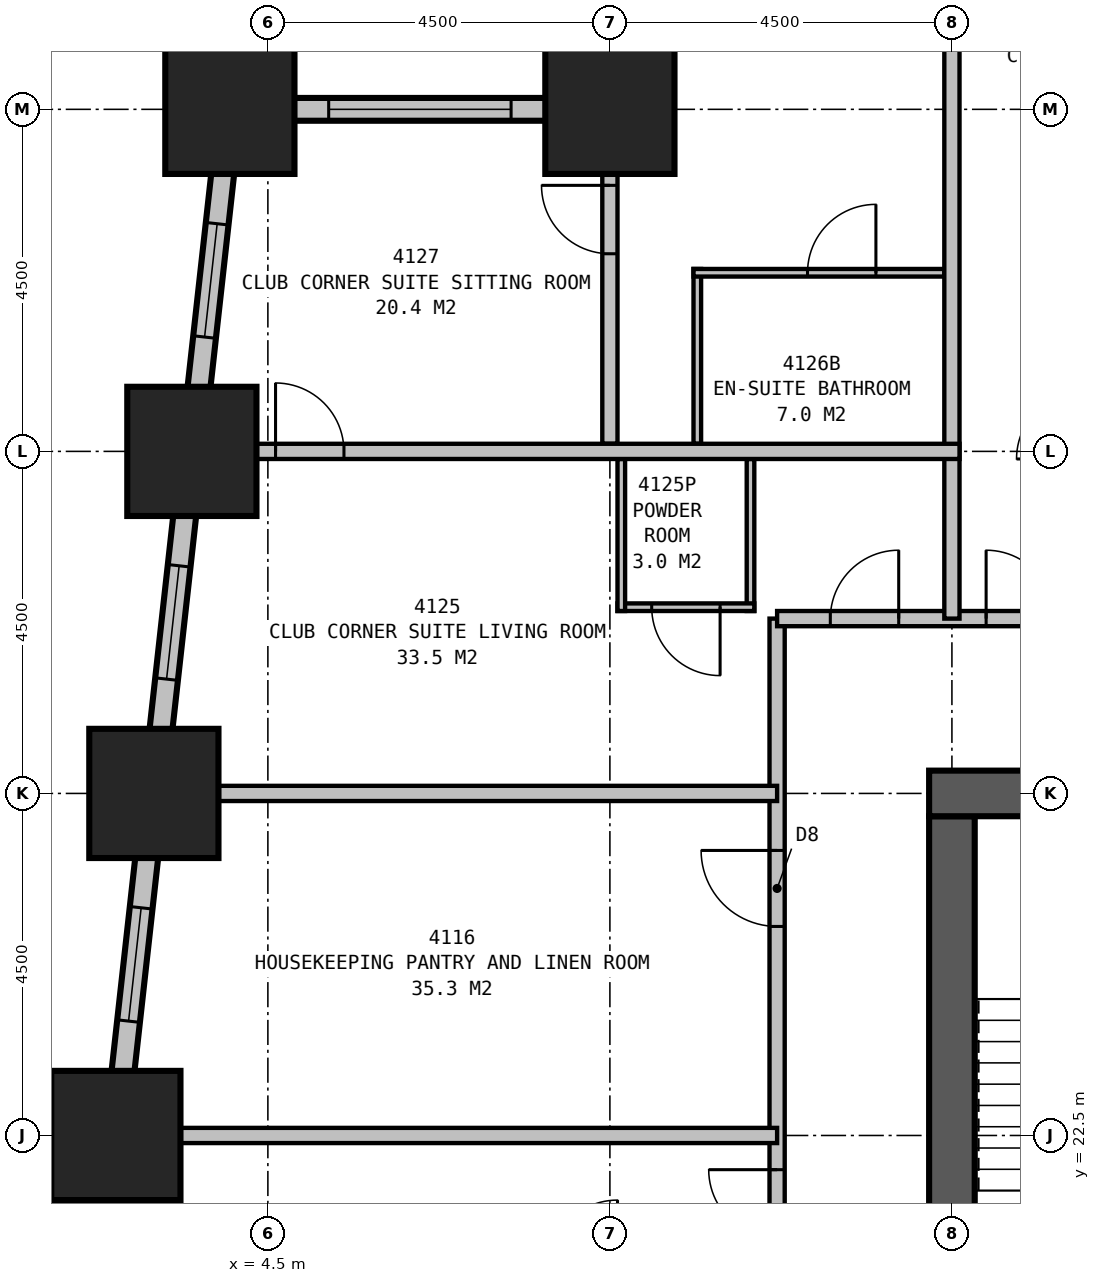
"""IFC4 building model, lengths in metres.
Left out: names, types, materials, properties, quantities, classifications, styles, units other than length and angle.
Written with IfcOpenShell. Run it as: python <this file> out.ifc"""

import sys

from ifc_helpers import new_model, si_unit, direction, frame, frame_2d, origin, origin_2d, place, context, subcontext, project, spatial, rectangle, extrude, element, fill, save


model = new_model("IFC4")
c1 = context("Model", 3, precision=1e-05, world=origin(), true_north=direction((0.0, 1.0)))
c2 = subcontext(c1, "Body", "Model", "MODEL_VIEW")
j1 = project(units=[si_unit("LENGTHUNIT", "METRE"), si_unit("PLANEANGLEUNIT", "RADIAN")], contexts=[c1])
p1 = place(None, origin())
s1 = spatial("IfcSite", under=j1, at=p1, CompositionType="ELEMENT")
p2 = place(p1, origin())
s2 = spatial("IfcBuilding", under=s1, at=p2, CompositionType="ELEMENT")
p3 = place(p2, frame((0.0, 0.0, 162.4)))
s3 = spatial("IfcBuildingStorey", under=s2, at=p3, CompositionType="ELEMENT", Elevation=162.4)
for number, where, z_axis, x_axis in (
    (1, (9.0, 36.0, 0.0), (0.0, 0.0, 1.0), (1.0, 0.0, 0.0)),
    (2, (4.0, 36.0, 0.0), (0.0, 0.0, 1.0), (1.0, 0.0, 0.0)),
    (3, (3.5, 31.5, 0.0), (0.0, 0.0, 1.0), (1.0, 0.0, 0.0)),
    (4, (3.0, 27.0, 0.0), (0.0, 0.0, 1.0), (1.0, 0.0, 0.0)),
    (5, (2.5, 22.5, 0.0), (0.0, 0.0, 1.0), (1.0, 0.0, 0.0)),
):
    element("IfcColumn", number, at=place(p3, frame(where, z_axis=z_axis, x_axis=x_axis)), inside=s3, PredefinedType="COLUMN", context=c2, shape_type="SweptSolid", body=[
        extrude(rectangle(XDim=1.7, YDim=1.7, at=origin_2d()), origin(), (0.0, 0.0, 1.0), 3.5),
    ])
p4 = place(p3, frame((36.3, 27.0, 0.0), z_axis=(0.0, 0.0, 1.0), x_axis=(-1.0, 0.0, 0.0)))
e6 = element("IfcWall", 6, at=p4, inside=s3, PredefinedType="SHEAR", context=c2, shape_type="SweptSolid", body=[
    extrude(rectangle(XDim=23.1, YDim=0.6, at=frame_2d((11.55, 0.0))), origin(), (0.0, 0.0, 1.0), 3.5),
])
p5 = place(p4, frame((17.05, 0.0, 0.0)))
e7 = element("IfcOpeningElement", 7, at=p5, cuts=e6, PredefinedType="OPENING", context=c2, shape_type="SweptSolid", body=[
    extrude(rectangle(XDim=1.0, YDim=2.1, at=frame_2d((0.5, 1.05))), frame((0.0, 0.31, 0.0), z_axis=(0.0, -1.0, 0.0), x_axis=(1.0, 0.0, 0.0)), (0.0, 0.0, 1.0), 0.62),
])
p6 = place(p4, frame((12.05, 0.0, 0.0)))
e8 = element("IfcOpeningElement", 8, at=p6, cuts=e6, PredefinedType="OPENING", context=c2, shape_type="SweptSolid", body=[
    extrude(rectangle(XDim=1.0, YDim=2.1, at=frame_2d((0.5, 1.05))), frame((0.0, 0.31, 0.0), z_axis=(0.0, -1.0, 0.0), x_axis=(1.0, 0.0, 0.0)), (0.0, 0.0, 1.0), 0.62),
])
p7 = place(p4, frame((7.05, 0.0, 0.0)))
e9 = element("IfcOpeningElement", 9, at=p7, cuts=e6, PredefinedType="OPENING", context=c2, shape_type="SweptSolid", body=[
    extrude(rectangle(XDim=1.0, YDim=2.1, at=frame_2d((0.5, 1.05))), frame((0.0, 0.31, 0.0), z_axis=(0.0, -1.0, 0.0), x_axis=(1.0, 0.0, 0.0)), (0.0, 0.0, 1.0), 0.62),
])
p8 = place(p3, frame((13.5, 26.7, 0.0), z_axis=(0.0, 0.0, 1.0), x_axis=(0.0, -1.0, 0.0)))
e10 = element("IfcWall", 10, at=p8, inside=s3, PredefinedType="SHEAR", context=c2, shape_type="SweptSolid", body=[
    extrude(rectangle(XDim=6.7, YDim=0.6, at=frame_2d((3.35, 0.0))), origin(), (0.0, 0.0, 1.0), 3.5),
])
p9 = place(p3, frame((9.0, 40.65, 0.0), z_axis=(0.0, 0.0, 1.0), x_axis=(0.0, -1.0, 0.0)))
e11 = element("IfcWall", 11, at=p9, inside=s3, PredefinedType="STANDARD", context=c2, shape_type="SweptSolid", body=[
    extrude(rectangle(XDim=4.8, YDim=0.3, at=frame_2d((2.4, 0.0))), origin(), (0.0, 0.0, 1.0), 2.25),
])
p10 = place(p9, frame((1.2, 0.0, 0.5)))
e12 = element("IfcOpeningElement", 12, at=p10, cuts=e11, PredefinedType="OPENING", context=c2, shape_type="SweptSolid", body=[
    extrude(rectangle(XDim=2.4, YDim=1.6, at=frame_2d((1.2, 0.8))), frame((0.0, 0.16, 0.0), z_axis=(0.0, -1.0, 0.0), x_axis=(1.0, 0.0, 0.0)), (0.0, 0.0, 1.0), 0.32),
])
p11 = place(p3, frame((9.15, 36.0, 0.0), z_axis=(0.0, 0.0, 1.0), x_axis=(-1.0, 0.0, 0.0)))
e13 = element("IfcWall", 13, at=p11, inside=s3, PredefinedType="STANDARD", context=c2, shape_type="SweptSolid", body=[
    extrude(rectangle(XDim=5.3, YDim=0.3, at=frame_2d((2.65, 0.0))), origin(), (0.0, 0.0, 1.0), 2.25),
])
p12 = place(p11, frame((1.45, 0.0, 0.5)))
e14 = element("IfcOpeningElement", 14, at=p12, cuts=e13, PredefinedType="OPENING", context=c2, shape_type="SweptSolid", body=[
    extrude(rectangle(XDim=2.4, YDim=1.6, at=frame_2d((1.2, 0.8))), frame((0.0, 0.16, 0.0), z_axis=(0.0, -1.0, 0.0), x_axis=(1.0, 0.0, 0.0)), (0.0, 0.0, 1.0), 0.32),
])
p13 = place(p3, frame((4.017, 36.149, 0.0), z_axis=(0.0, 0.0, 1.0), x_axis=(-0.110433862387, -0.993883475081, 0.0)))
e15 = element("IfcWall", 15, at=p13, inside=s3, PredefinedType="STANDARD", context=c2, shape_type="SweptSolid", body=[
    extrude(rectangle(XDim=22.939, YDim=0.3, at=frame_2d((11.469, 0.0))), origin(), (0.0, 0.0, 1.0), 2.25),
])
p14 = place(p13, frame((1.664, 0.0, 0.5)))
e16 = element("IfcOpeningElement", 16, at=p14, cuts=e15, PredefinedType="OPENING", context=c2, shape_type="SweptSolid", body=[
    extrude(rectangle(XDim=1.5, YDim=1.6, at=frame_2d((0.75, 0.8))), frame((0.0, 0.16, 0.0), z_axis=(0.0, -1.0, 0.0), x_axis=(1.0, 0.0, 0.0)), (0.0, 0.0, 1.0), 0.32),
])
p15 = place(p13, frame((6.192, 0.0, 0.5)))
e17 = element("IfcOpeningElement", 17, at=p15, cuts=e15, PredefinedType="OPENING", context=c2, shape_type="SweptSolid", body=[
    extrude(rectangle(XDim=1.5, YDim=1.6, at=frame_2d((0.75, 0.8))), frame((0.0, 0.16, 0.0), z_axis=(0.0, -1.0, 0.0), x_axis=(1.0, 0.0, 0.0)), (0.0, 0.0, 1.0), 0.32),
])
p16 = place(p13, frame((10.719, 0.0, 0.5)))
e18 = element("IfcOpeningElement", 18, at=p16, cuts=e15, PredefinedType="OPENING", context=c2, shape_type="SweptSolid", body=[
    extrude(rectangle(XDim=1.5, YDim=1.6, at=frame_2d((0.75, 0.8))), frame((0.0, 0.16, 0.0), z_axis=(0.0, -1.0, 0.0), x_axis=(1.0, 0.0, 0.0)), (0.0, 0.0, 1.0), 0.32),
])
p17 = place(p13, frame((15.247, 0.0, 0.5)))
e19 = element("IfcOpeningElement", 19, at=p17, cuts=e15, PredefinedType="OPENING", context=c2, shape_type="SweptSolid", body=[
    extrude(rectangle(XDim=1.5, YDim=1.6, at=frame_2d((0.75, 0.8))), frame((0.0, 0.16, 0.0), z_axis=(0.0, -1.0, 0.0), x_axis=(1.0, 0.0, 0.0)), (0.0, 0.0, 1.0), 0.32),
])
p18 = place(p13, frame((19.775, 0.0, 0.5)))
e20 = element("IfcOpeningElement", 20, at=p18, cuts=e15, PredefinedType="OPENING", context=c2, shape_type="SweptSolid", body=[
    extrude(rectangle(XDim=1.5, YDim=1.6, at=frame_2d((0.75, 0.8))), frame((0.0, 0.16, 0.0), z_axis=(0.0, -1.0, 0.0), x_axis=(1.0, 0.0, 0.0)), (0.0, 0.0, 1.0), 0.32),
])
p19 = place(p3, frame((11.2, 29.3, 0.0), z_axis=(0.0, 0.0, 1.0), x_axis=(1.0, 0.0, 0.0)))
e21 = element("IfcWall", 21, at=p19, inside=s3, PredefinedType="PARTITIONING", context=c2, shape_type="SweptSolid", body=[
    extrude(rectangle(XDim=27.1, YDim=0.2, at=frame_2d((13.55, 0.0))), origin(), (0.0, 0.0, 1.0), 3.25),
])
p20 = place(p19, frame((2.75, 0.0, 0.0)))
e22 = element("IfcOpeningElement", 22, at=p20, cuts=e21, PredefinedType="OPENING", context=c2, shape_type="SweptSolid", body=[
    extrude(rectangle(XDim=0.9, YDim=2.1, at=frame_2d((0.45, 1.05))), frame((0.0, 0.11, 0.0), z_axis=(0.0, -1.0, 0.0), x_axis=(1.0, 0.0, 0.0)), (0.0, 0.0, 1.0), 0.22),
])
p21 = place(p19, frame((9.55, 0.0, 0.0)))
e23 = element("IfcOpeningElement", 23, at=p21, cuts=e21, PredefinedType="OPENING", context=c2, shape_type="SweptSolid", body=[
    extrude(rectangle(XDim=0.9, YDim=2.1, at=frame_2d((0.45, 1.05))), frame((0.0, 0.11, 0.0), z_axis=(0.0, -1.0, 0.0), x_axis=(1.0, 0.0, 0.0)), (0.0, 0.0, 1.0), 0.22),
])
p22 = place(p19, frame((16.25, 0.0, 0.0)))
e24 = element("IfcOpeningElement", 24, at=p22, cuts=e21, PredefinedType="OPENING", context=c2, shape_type="SweptSolid", body=[
    extrude(rectangle(XDim=0.9, YDim=2.1, at=frame_2d((0.45, 1.05))), frame((0.0, 0.11, 0.0), z_axis=(0.0, -1.0, 0.0), x_axis=(1.0, 0.0, 0.0)), (0.0, 0.0, 1.0), 0.22),
])
p23 = place(p19, frame((20.75, 0.0, 0.0)))
e25 = element("IfcOpeningElement", 25, at=p23, cuts=e21, PredefinedType="OPENING", context=c2, shape_type="SweptSolid", body=[
    extrude(rectangle(XDim=0.9, YDim=2.1, at=frame_2d((0.45, 1.05))), frame((0.0, 0.11, 0.0), z_axis=(0.0, -1.0, 0.0), x_axis=(1.0, 0.0, 0.0)), (0.0, 0.0, 1.0), 0.22),
])
p24 = place(p19, frame((25.5, 0.0, 0.0)))
e26 = element("IfcOpeningElement", 26, at=p24, cuts=e21, PredefinedType="OPENING", context=c2, shape_type="SweptSolid", body=[
    extrude(rectangle(XDim=0.9, YDim=2.1, at=frame_2d((0.45, 1.05))), frame((0.0, 0.11, 0.0), z_axis=(0.0, -1.0, 0.0), x_axis=(1.0, 0.0, 0.0)), (0.0, 0.0, 1.0), 0.22),
])
p25 = place(p19, frame((0.7, 0.0, 0.0)))
e27 = element("IfcOpeningElement", 27, at=p25, cuts=e21, PredefinedType="OPENING", context=c2, shape_type="SweptSolid", body=[
    extrude(rectangle(XDim=0.9, YDim=2.1, at=frame_2d((0.45, 1.05))), frame((0.0, 0.11, 0.0), z_axis=(0.0, -1.0, 0.0), x_axis=(1.0, 0.0, 0.0)), (0.0, 0.0, 1.0), 0.22),
])
p26 = place(p3, frame((11.2, 10.6, 0.0), z_axis=(0.0, 0.0, 1.0), x_axis=(0.0, 1.0, 0.0)))
e28 = element("IfcWall", 28, at=p26, inside=s3, PredefinedType="PARTITIONING", context=c2, shape_type="SweptSolid", body=[
    extrude(rectangle(XDim=18.7, YDim=0.2, at=frame_2d((9.35, 0.0))), origin(), (0.0, 0.0, 1.0), 3.25),
])
p27 = place(p26, frame((6.05, 0.0, 0.0)))
e29 = element("IfcOpeningElement", 29, at=p27, cuts=e28, PredefinedType="OPENING", context=c2, shape_type="SweptSolid", body=[
    extrude(rectangle(XDim=0.9, YDim=2.1, at=frame_2d((0.45, 1.05))), frame((0.0, 0.11, 0.0), z_axis=(0.0, -1.0, 0.0), x_axis=(1.0, 0.0, 0.0)), (0.0, 0.0, 1.0), 0.22),
])
p28 = place(p26, frame((10.55, 0.0, 0.0)))
e30 = element("IfcOpeningElement", 30, at=p28, cuts=e28, PredefinedType="OPENING", context=c2, shape_type="SweptSolid", body=[
    extrude(rectangle(XDim=0.9, YDim=2.1, at=frame_2d((0.45, 1.05))), frame((0.0, 0.11, 0.0), z_axis=(0.0, -1.0, 0.0), x_axis=(1.0, 0.0, 0.0)), (0.0, 0.0, 1.0), 0.22),
])
p29 = place(p26, frame((14.65, 0.0, 0.0)))
e31 = element("IfcOpeningElement", 31, at=p29, cuts=e28, PredefinedType="OPENING", context=c2, shape_type="SweptSolid", body=[
    extrude(rectangle(XDim=1.0, YDim=2.1, at=frame_2d((0.5, 1.05))), frame((0.0, 0.11, 0.0), z_axis=(0.0, -1.0, 0.0), x_axis=(1.0, 0.0, 0.0)), (0.0, 0.0, 1.0), 0.22),
])
p30 = place(p3, frame((11.2, 22.5, 0.0), z_axis=(0.0, 0.0, 1.0), x_axis=(-1.0, 0.0, 0.0)))
e32 = element("IfcWall", 32, at=p30, inside=s3, PredefinedType="PARTITIONING", context=c2, shape_type="SweptSolid", body=[
    extrude(rectangle(XDim=8.699, YDim=0.2, at=frame_2d((4.35, 0.0))), origin(), (0.0, 0.0, 1.0), 2.25),
])
p31 = place(p3, frame((11.2, 27.0, 0.0), z_axis=(0.0, 0.0, 1.0), x_axis=(-1.0, 0.0, 0.0)))
e33 = element("IfcWall", 33, at=p31, inside=s3, PredefinedType="PARTITIONING", context=c2, shape_type="SweptSolid", body=[
    extrude(rectangle(XDim=7.977, YDim=0.2, at=frame_2d((3.988, 0.0))), origin(), (0.0, 0.0, 1.0), 1.95),
])
p32 = place(p3, frame((13.5, 29.3, 0.0), z_axis=(0.0, 0.0, 1.0), x_axis=(0.0, 1.0, 0.0)))
e34 = element("IfcWall", 34, at=p32, inside=s3, PredefinedType="PARTITIONING", context=c2, shape_type="SweptSolid", body=[
    extrude(rectangle(XDim=11.2, YDim=0.2, at=frame_2d((5.6, 0.0))), origin(), (0.0, 0.0, 1.0), 2.25),
])
p33 = place(p3, frame((13.6, 31.5, 0.0), z_axis=(0.0, 0.0, 1.0), x_axis=(-1.0, 0.0, 0.0)))
e35 = element("IfcWall", 35, at=p33, inside=s3, PredefinedType="PARTITIONING", context=c2, shape_type="SweptSolid", body=[
    extrude(rectangle(XDim=10.099, YDim=0.2, at=frame_2d((5.05, 0.0))), origin(), (0.0, 0.0, 1.0), 3.25),
])
p34 = place(p33, frame((8.999, 0.0, 0.0), z_axis=(0.0, 0.0, 1.0), x_axis=(-1.0, 0.0, 0.0)))
e36 = element("IfcOpeningElement", 36, at=p34, cuts=e35, PredefinedType="OPENING", context=c2, shape_type="SweptSolid", body=[
    extrude(rectangle(XDim=0.9, YDim=2.1, at=frame_2d((0.45, 1.05))), frame((0.0, 0.11, 0.0), z_axis=(0.0, -1.0, 0.0), x_axis=(1.0, 0.0, 0.0)), (0.0, 0.0, 1.0), 0.22),
])
p35 = place(p3, frame((9.15, 31.4, 0.0), z_axis=(0.0, 0.0, 1.0), x_axis=(0.0, -1.0, 0.0)))
e37 = element("IfcWall", 37, at=p35, inside=s3, PredefinedType="PLUMBINGWALL", context=c2, shape_type="SweptSolid", body=[
    extrude(rectangle(XDim=2.0, YDim=0.1, at=frame_2d((1.0, 0.0))), origin(), (0.0, 0.0, 1.0), 2.25),
])
p36 = place(p3, frame((10.85, 31.4, 0.0), z_axis=(0.0, 0.0, 1.0), x_axis=(0.0, -1.0, 0.0)))
e38 = element("IfcWall", 38, at=p36, inside=s3, PredefinedType="PLUMBINGWALL", context=c2, shape_type="SweptSolid", body=[
    extrude(rectangle(XDim=2.0, YDim=0.1, at=frame_2d((1.0, 0.0))), origin(), (0.0, 0.0, 1.0), 3.25),
])
p37 = place(p3, frame((10.9, 29.45, 0.0), z_axis=(0.0, 0.0, 1.0), x_axis=(-1.0, 0.0, 0.0)))
e39 = element("IfcWall", 39, at=p37, inside=s3, PredefinedType="PLUMBINGWALL", context=c2, shape_type="SweptSolid", body=[
    extrude(rectangle(XDim=1.8, YDim=0.1, at=frame_2d((0.9, 0.0))), origin(), (0.0, 0.0, 1.0), 3.25),
])
p38 = place(p37, frame((0.45, 0.0, 0.0)))
e40 = element("IfcOpeningElement", 40, at=p38, cuts=e39, PredefinedType="OPENING", context=c2, shape_type="SweptSolid", body=[
    extrude(rectangle(XDim=0.9, YDim=2.1, at=frame_2d((0.45, 1.05))), frame((0.0, 0.06, 0.0), z_axis=(0.0, -1.0, 0.0), x_axis=(1.0, 0.0, 0.0)), (0.0, 0.0, 1.0), 0.12),
])
p39 = place(p3, frame((9.0, 31.6, 0.0), z_axis=(0.0, 0.0, 1.0), x_axis=(0.0, 1.0, 0.0)))
e41 = element("IfcWall", 41, at=p39, inside=s3, PredefinedType="PARTITIONING", context=c2, shape_type="SweptSolid", body=[
    extrude(rectangle(XDim=4.4, YDim=0.2, at=frame_2d((2.2, 0.0))), origin(), (0.0, 0.0, 1.0), 2.25),
])
p40 = place(p39, frame((2.5, 0.0, 0.0)))
e42 = element("IfcOpeningElement", 42, at=p40, cuts=e41, PredefinedType="OPENING", context=c2, shape_type="SweptSolid", body=[
    extrude(rectangle(XDim=0.9, YDim=2.1, at=frame_2d((0.45, 1.05))), frame((0.0, 0.11, 0.0), z_axis=(0.0, -1.0, 0.0), x_axis=(1.0, 0.0, 0.0)), (0.0, 0.0, 1.0), 0.22),
])
p41 = place(p3, frame((10.15, 31.6, 0.0), z_axis=(0.0, 0.0, 1.0), x_axis=(0.0, 1.0, 0.0)))
e43 = element("IfcWall", 43, at=p41, inside=s3, PredefinedType="PLUMBINGWALL", context=c2, shape_type="SweptSolid", body=[
    extrude(rectangle(XDim=2.3, YDim=0.1, at=frame_2d((1.15, 0.0))), origin(), (0.0, 0.0, 1.0), 3.25),
])
p42 = place(p3, frame((13.4, 33.85, 0.0), z_axis=(0.0, 0.0, 1.0), x_axis=(-1.0, 0.0, 0.0)))
e44 = element("IfcWall", 44, at=p42, inside=s3, PredefinedType="PLUMBINGWALL", context=c2, shape_type="SweptSolid", body=[
    extrude(rectangle(XDim=3.3, YDim=0.1, at=frame_2d((1.65, 0.0))), origin(), (0.0, 0.0, 1.0), 3.25),
])
p43 = place(p42, frame((1.8, 0.0, 0.0), z_axis=(0.0, 0.0, 1.0), x_axis=(-1.0, 0.0, 0.0)))
e45 = element("IfcOpeningElement", 45, at=p43, cuts=e44, PredefinedType="OPENING", context=c2, shape_type="SweptSolid", body=[
    extrude(rectangle(XDim=0.9, YDim=2.1, at=frame_2d((0.45, 1.05))), frame((0.0, 0.06, 0.0), z_axis=(0.0, -1.0, 0.0), x_axis=(1.0, 0.0, 0.0)), (0.0, 0.0, 1.0), 0.12),
])
p44 = place(p12, origin())
e46 = element("IfcWindow", 46, at=p44, inside=s3, PartitioningType="SINGLE_PANEL", PredefinedType="WINDOW", context=c2, shape_type="SweptSolid", body=[
    extrude(rectangle(XDim=2.4, YDim=1.6, at=frame_2d((1.2, 0.8))), frame((0.0, 0.03, 0.0), z_axis=(0.0, -1.0, 0.0), x_axis=(1.0, 0.0, 0.0)), (0.0, 0.0, 1.0), 0.06),
])
fill(e14, e46)
p45 = place(p14, origin())
e47 = element("IfcWindow", 47, at=p45, inside=s3, PartitioningType="SINGLE_PANEL", PredefinedType="WINDOW", context=c2, shape_type="SweptSolid", body=[
    extrude(rectangle(XDim=1.5, YDim=1.6, at=frame_2d((0.75, 0.8))), frame((0.0, 0.03, 0.0), z_axis=(0.0, -1.0, 0.0), x_axis=(1.0, 0.0, 0.0)), (0.0, 0.0, 1.0), 0.06),
])
fill(e16, e47)
p46 = place(p15, origin())
e48 = element("IfcWindow", 48, at=p46, inside=s3, PartitioningType="SINGLE_PANEL", PredefinedType="WINDOW", context=c2, shape_type="SweptSolid", body=[
    extrude(rectangle(XDim=1.5, YDim=1.6, at=frame_2d((0.75, 0.8))), frame((0.0, 0.03, 0.0), z_axis=(0.0, -1.0, 0.0), x_axis=(1.0, 0.0, 0.0)), (0.0, 0.0, 1.0), 0.06),
])
fill(e17, e48)
p47 = place(p16, origin())
e49 = element("IfcWindow", 49, at=p47, inside=s3, PartitioningType="SINGLE_PANEL", PredefinedType="WINDOW", context=c2, shape_type="SweptSolid", body=[
    extrude(rectangle(XDim=1.5, YDim=1.6, at=frame_2d((0.75, 0.8))), frame((0.0, 0.03, 0.0), z_axis=(0.0, -1.0, 0.0), x_axis=(1.0, 0.0, 0.0)), (0.0, 0.0, 1.0), 0.06),
])
fill(e18, e49)
p48 = place(p20, origin())
e50 = element("IfcDoor", 50, at=p48, inside=s3, OperationType="SINGLE_SWING_LEFT", PredefinedType="DOOR", context=c2, shape_type="SweptSolid", body=[
    extrude(rectangle(XDim=0.9, YDim=2.1, at=frame_2d((0.45, 1.05))), frame((0.0, 0.025, 0.0), z_axis=(0.0, -1.0, 0.0), x_axis=(1.0, 0.0, 0.0)), (0.0, 0.0, 1.0), 0.05),
])
fill(e22, e50)
p49 = place(p25, origin())
e51 = element("IfcDoor", 51, at=p49, inside=s3, OperationType="SINGLE_SWING_RIGHT", PredefinedType="DOOR", context=c2, shape_type="SweptSolid", body=[
    extrude(rectangle(XDim=0.9, YDim=2.1, at=frame_2d((0.45, 1.05))), frame((0.0, 0.025, 0.0), z_axis=(0.0, -1.0, 0.0), x_axis=(1.0, 0.0, 0.0)), (0.0, 0.0, 1.0), 0.05),
])
fill(e27, e51)
p50 = place(p28, origin())
e52 = element("IfcDoor", 52, at=p50, inside=s3, OperationType="SINGLE_SWING_RIGHT", PredefinedType="DOOR", context=c2, shape_type="SweptSolid", body=[
    extrude(rectangle(XDim=0.9, YDim=2.1, at=frame_2d((0.45, 1.05))), frame((0.0, 0.025, 0.0), z_axis=(0.0, -1.0, 0.0), x_axis=(1.0, 0.0, 0.0)), (0.0, 0.0, 1.0), 0.05),
])
fill(e30, e52)
p51 = place(p29, origin())
e53 = element("IfcDoor", 53, at=p51, inside=s3, OperationType="SINGLE_SWING_RIGHT", PredefinedType="DOOR", context=c2, shape_type="SweptSolid", body=[
    extrude(rectangle(XDim=1.0, YDim=2.1, at=frame_2d((0.5, 1.05))), frame((0.0, 0.025, 0.0), z_axis=(0.0, -1.0, 0.0), x_axis=(1.0, 0.0, 0.0)), (0.0, 0.0, 1.0), 0.05),
])
fill(e31, e53)
p52 = place(p34, origin())
e54 = element("IfcDoor", 54, at=p52, inside=s3, OperationType="SINGLE_SWING_LEFT", PredefinedType="DOOR", context=c2, shape_type="SweptSolid", body=[
    extrude(rectangle(XDim=0.9, YDim=2.1, at=frame_2d((0.45, 1.05))), frame((0.0, 0.025, 0.0), z_axis=(0.0, -1.0, 0.0), x_axis=(1.0, 0.0, 0.0)), (0.0, 0.0, 1.0), 0.05),
])
fill(e36, e54)
p53 = place(p38, origin())
e55 = element("IfcDoor", 55, at=p53, inside=s3, OperationType="SINGLE_SWING_LEFT", PredefinedType="DOOR", context=c2, shape_type="SweptSolid", body=[
    extrude(rectangle(XDim=0.9, YDim=2.1, at=frame_2d((0.45, 1.05))), frame((0.0, 0.025, 0.0), z_axis=(0.0, -1.0, 0.0), x_axis=(1.0, 0.0, 0.0)), (0.0, 0.0, 1.0), 0.05),
])
fill(e40, e55)
p54 = place(p40, origin())
e56 = element("IfcDoor", 56, at=p54, inside=s3, OperationType="SINGLE_SWING_RIGHT", PredefinedType="DOOR", context=c2, shape_type="SweptSolid", body=[
    extrude(rectangle(XDim=0.9, YDim=2.1, at=frame_2d((0.45, 1.05))), frame((0.0, 0.025, 0.0), z_axis=(0.0, -1.0, 0.0), x_axis=(1.0, 0.0, 0.0)), (0.0, 0.0, 1.0), 0.05),
])
fill(e42, e56)
p55 = place(p43, origin())
e57 = element("IfcDoor", 57, at=p55, inside=s3, OperationType="SINGLE_SWING_RIGHT", PredefinedType="DOOR", context=c2, shape_type="SweptSolid", body=[
    extrude(rectangle(XDim=0.9, YDim=2.1, at=frame_2d((0.45, 1.05))), frame((0.0, 0.025, 0.0), z_axis=(0.0, -1.0, 0.0), x_axis=(1.0, 0.0, 0.0)), (0.0, 0.0, 1.0), 0.05),
])
fill(e45, e57)
save(model, sys.argv[1])
